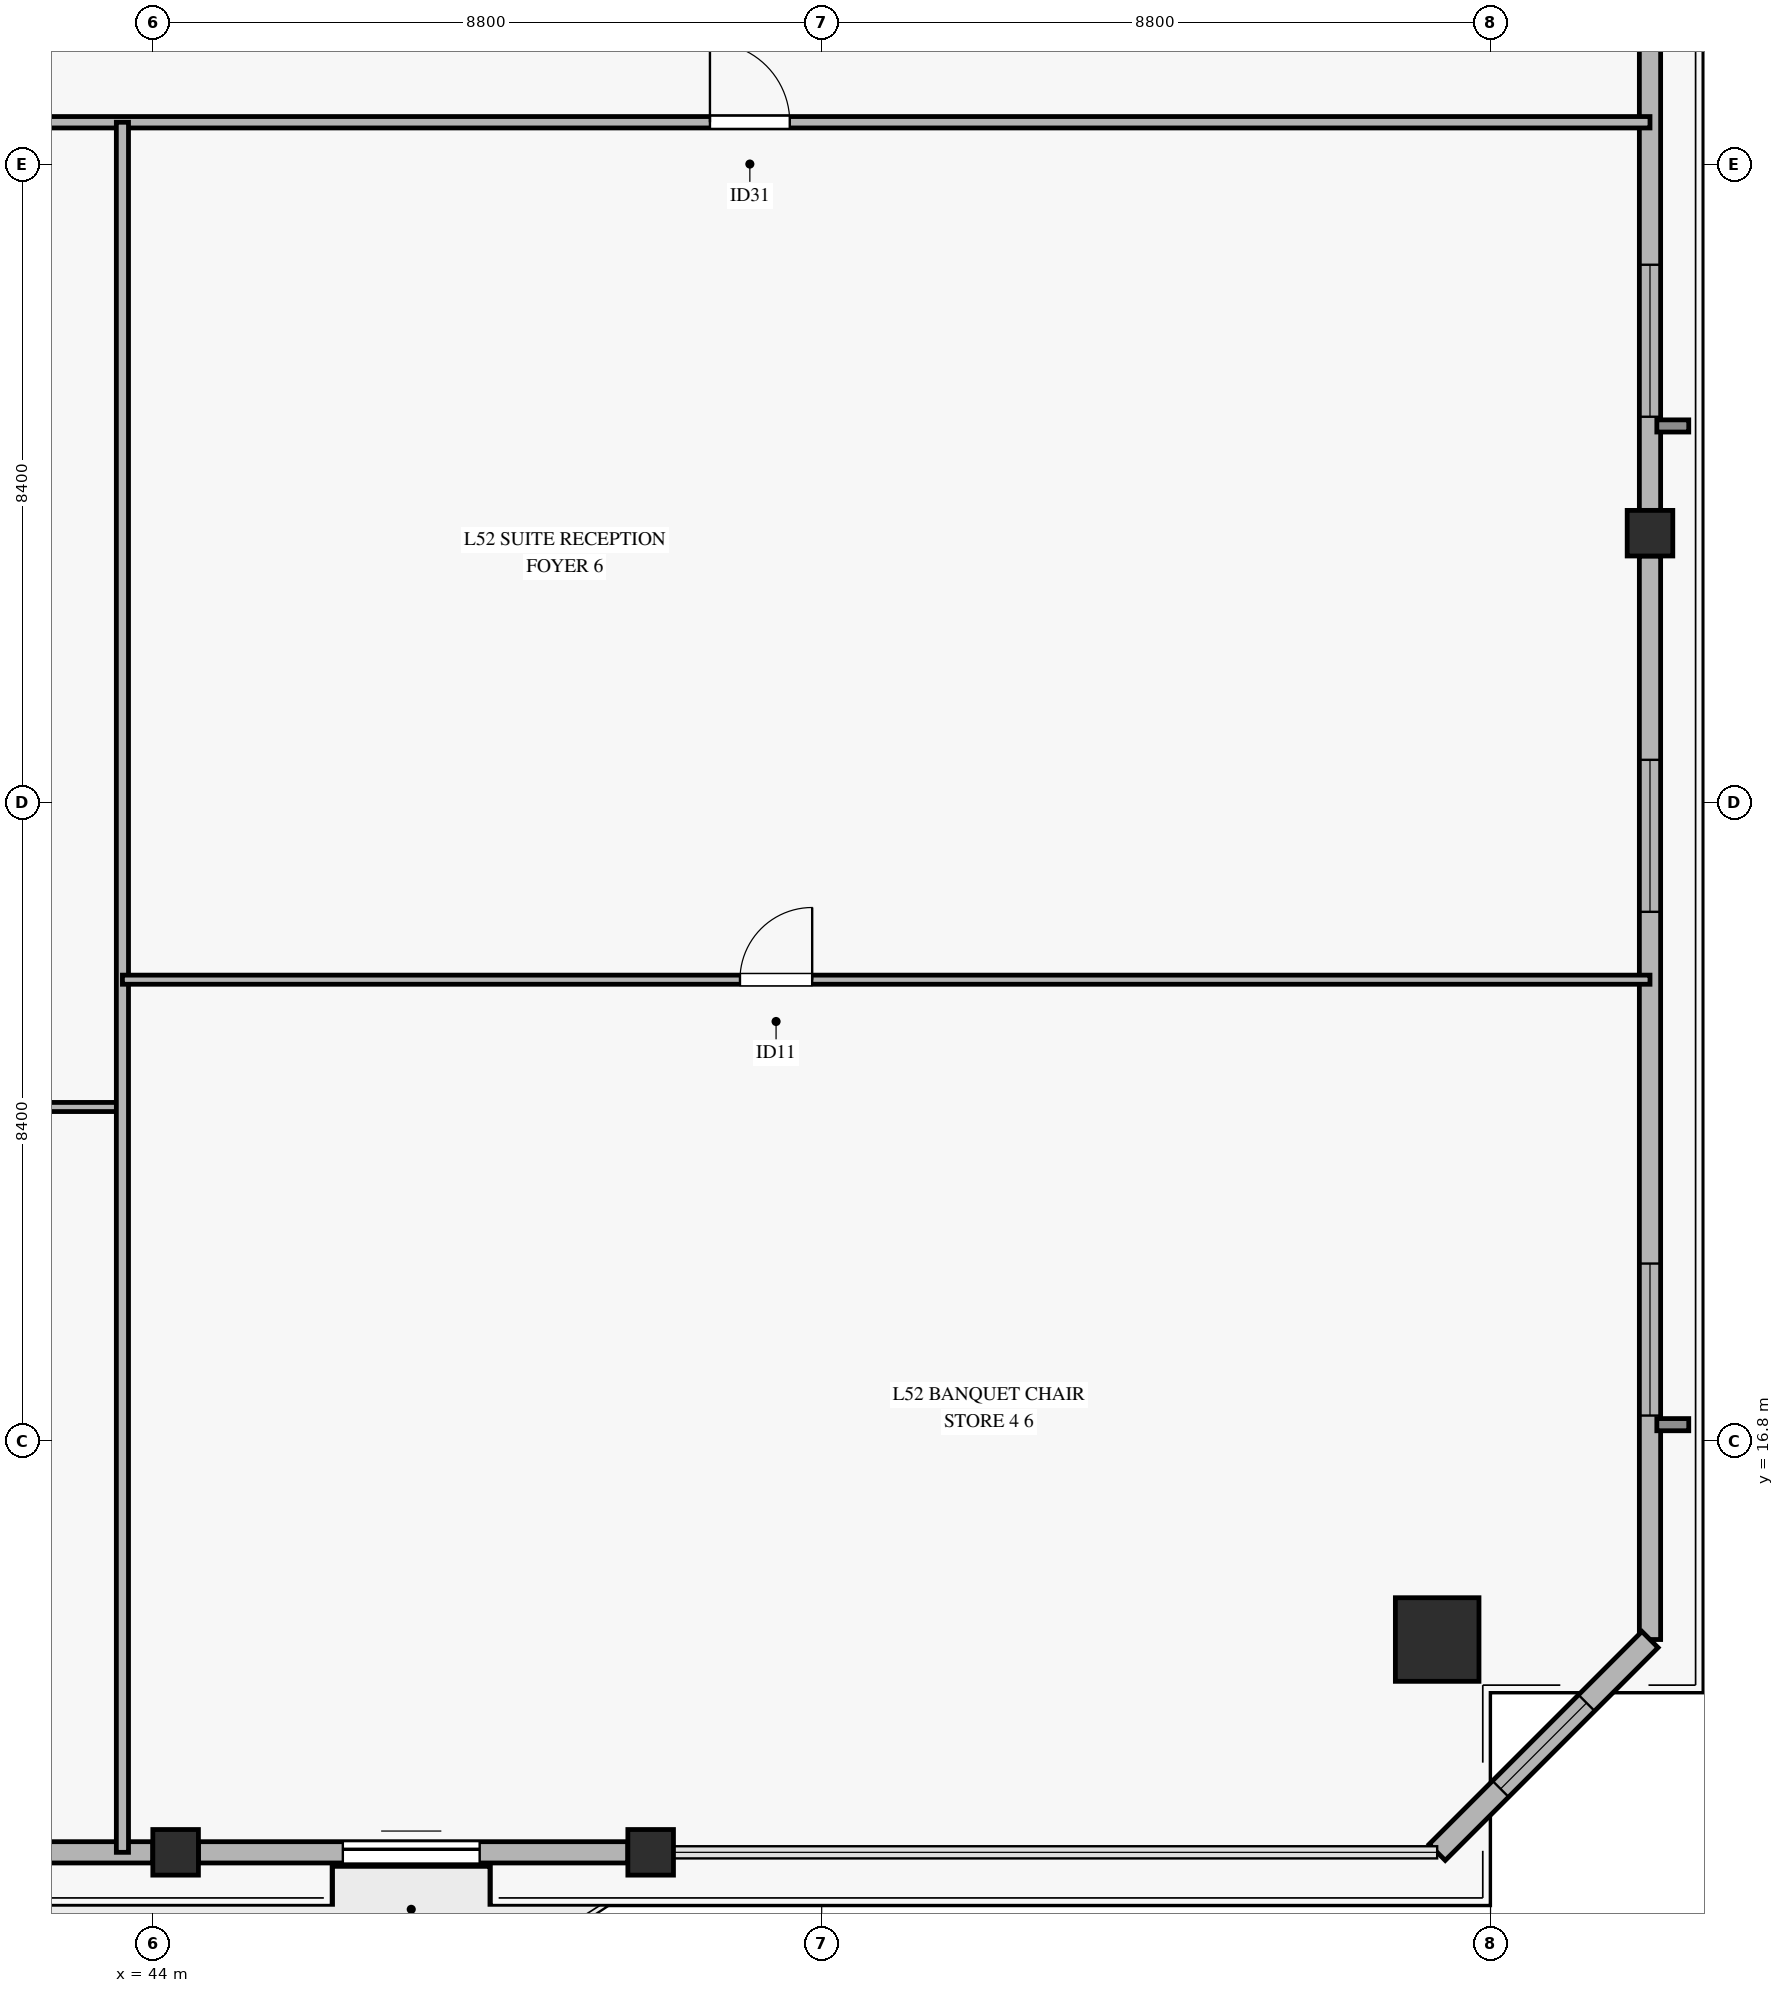
"""IFC4 building model, lengths in metres.
Left out: names, types, materials, properties, quantities, classifications, styles, units other than length and angle.
Written with IfcOpenShell. Run it as: python <this file> out.ifc"""

import sys

from ifc_helpers import new_model, si_unit, direction, frame, frame_2d, origin, origin_2d, place, context, subcontext, project, spatial, rectangle, hollow_rectangle, extrude, source, transform, mapped, element, fill, save


model = new_model("IFC4")
c1 = context("Model", 3, precision=1e-05, world=origin(), true_north=direction((0.0, 1.0)))
c2 = subcontext(c1, "Body", "Model", "MODEL_VIEW")
j1 = project(units=[si_unit("LENGTHUNIT", "METRE"), si_unit("PLANEANGLEUNIT", "RADIAN")], contexts=[c1])
p1 = place(None, origin())
s1 = spatial("IfcSite", under=j1, at=p1, CompositionType="ELEMENT")
p2 = place(p1, origin())
s2 = spatial("IfcBuilding", under=s1, at=p2, CompositionType="ELEMENT")
p3 = place(p2, frame((0.0, 0.0, 206.2)))
s3 = spatial("IfcBuildingStorey", under=s2, at=p3, CompositionType="ELEMENT", Elevation=206.2)
m1 = source(origin(), c2, "Body", "SweptSolid", [
    extrude(hollow_rectangle(XDim=1.1, YDim=1.1, WallThickness=0.05, at=origin_2d()), origin(), (0.0, 0.0, 1.0), 3.27),
])
p4 = place(p3, frame((60.898, 14.186, 0.0), z_axis=(0.0, 0.0, 1.0), x_axis=(1.0, 0.0, 0.0)))
e1 = element("IfcColumn", 1, at=p4, inside=s3, PredefinedType="COLUMN", context=c2, shape_type="MappedRepresentation", body=[
    mapped(m1, transform((0.0, 0.0, 0.0), x_axis=(1.0, 0.0, 0.0), y_axis=(0.0, 1.0, 0.0), z_axis=(0.0, 0.0, 1.0), scale=1.0)),
])
m2 = source(origin(), c2, "Body", "SweptSolid", [
    extrude(hollow_rectangle(XDim=0.6, YDim=0.6, WallThickness=0.028, at=origin_2d()), origin(), (0.0, 0.0, 1.0), 3.27),
])
for number, where, z_axis, x_axis in (
    (2, (44.3, 11.386, 0.0), (0.0, 0.0, 1.0), (1.0, 0.0, 0.0)),
    (3, (50.55, 11.386, 0.0), (0.0, 0.0, 1.0), (1.0, 0.0, 0.0)),
    (4, (63.698, 28.743, 0.0), (0.0, 0.0, 1.0), (1.0, 0.0, 0.0)),
):
    element("IfcColumn", number, at=place(p3, frame(where, z_axis=z_axis, x_axis=x_axis)), inside=s3, PredefinedType="COLUMN", context=c2, shape_type="MappedRepresentation", body=[
        mapped(m2, transform((0.0, 0.0, 0.0), x_axis=(1.0, 0.0, 0.0), y_axis=(0.0, 1.0, 0.0), z_axis=(0.0, 0.0, 1.0), scale=1.0)),
    ])
p5 = place(p3, frame((37.85, 11.386, 0.0), z_axis=(0.0, 0.0, 1.0), x_axis=(1.0, 0.0, 0.0)))
e5 = element("IfcWall", 5, at=p5, inside=s3, PredefinedType="SOLIDWALL", context=c2, shape_type="SweptSolid", body=[
    extrude(rectangle(XDim=6.15, YDim=0.28, at=frame_2d((3.075, 0.0))), origin(), (0.0, 0.0, 1.0), 2.75),
])
p6 = place(p3, frame((44.6, 11.386, 0.0), z_axis=(0.0, 0.0, 1.0), x_axis=(1.0, 0.0, 0.0)))
e6 = element("IfcWall", 6, at=p6, inside=s3, PredefinedType="SOLIDWALL", context=c2, shape_type="SweptSolid", body=[
    extrude(rectangle(XDim=5.65, YDim=0.28, at=frame_2d((2.825, 0.0))), origin(), (0.0, 0.0, 1.0), 2.75),
])
p7 = place(p6, frame((1.9, 0.0, 0.0)))
e7 = element("IfcOpeningElement", 7, at=p7, cuts=e6, PredefinedType="OPENING", context=c2, shape_type="SweptSolid", body=[
    extrude(rectangle(XDim=1.8, YDim=2.25, at=frame_2d((0.9, 1.125))), frame((0.0, 0.15, 0.0), z_axis=(0.0, -1.0, 0.0), x_axis=(1.0, 0.0, 0.0)), (0.0, 0.0, 1.0), 0.3),
])
p8 = place(p3, frame((63.698, 14.186, 0.0), z_axis=(0.0, 0.0, 1.0), x_axis=(0.0, 1.0, 0.0)))
e8 = element("IfcWall", 8, at=p8, inside=s3, PredefinedType="SOLIDWALL", context=c2, shape_type="SweptSolid", body=[
    extrude(rectangle(XDim=14.257, YDim=0.28, at=frame_2d((7.128, 0.0))), origin(), (0.0, 0.0, 1.0), 2.75),
])
p9 = place(p8, frame((2.947, 0.0, 0.45)))
e9 = element("IfcOpeningElement", 9, at=p9, cuts=e8, PredefinedType="OPENING", context=c2, shape_type="SweptSolid", body=[
    extrude(rectangle(XDim=2.0, YDim=2.0, at=frame_2d((1.0, 1.0))), frame((0.0, 0.15, 0.0), z_axis=(0.0, -1.0, 0.0), x_axis=(1.0, 0.0, 0.0)), (0.0, 0.0, 1.0), 0.3),
])
p10 = place(p8, frame((9.575, 0.0, 0.45)))
e10 = element("IfcOpeningElement", 10, at=p10, cuts=e8, PredefinedType="OPENING", context=c2, shape_type="SweptSolid", body=[
    extrude(rectangle(XDim=2.0, YDim=2.0, at=frame_2d((1.0, 1.0))), frame((0.0, 0.15, 0.0), z_axis=(0.0, -1.0, 0.0), x_axis=(1.0, 0.0, 0.0)), (0.0, 0.0, 1.0), 0.3),
])
p11 = place(p3, frame((63.698, 29.043, 0.0), z_axis=(0.0, 0.0, 1.0), x_axis=(0.0, 1.0, 0.0)))
e11 = element("IfcWall", 11, at=p11, inside=s3, PredefinedType="SOLIDWALL", context=c2, shape_type="SweptSolid", body=[
    extrude(rectangle(XDim=14.257, YDim=0.28, at=frame_2d((7.128, 0.0))), origin(), (0.0, 0.0, 1.0), 2.75),
])
p12 = place(p11, frame((1.232, 0.0, 0.45)))
e12 = element("IfcOpeningElement", 12, at=p12, cuts=e11, PredefinedType="OPENING", context=c2, shape_type="SweptSolid", body=[
    extrude(rectangle(XDim=2.0, YDim=2.0, at=frame_2d((1.0, 1.0))), frame((0.0, 0.15, 0.0), z_axis=(0.0, -1.0, 0.0), x_axis=(1.0, 0.0, 0.0)), (0.0, 0.0, 1.0), 0.3),
])
p13 = place(p11, frame((11.108, 0.0, 0.45)))
e13 = element("IfcOpeningElement", 13, at=p13, cuts=e11, PredefinedType="OPENING", context=c2, shape_type="SweptSolid", body=[
    extrude(rectangle(XDim=2.0, YDim=2.0, at=frame_2d((1.0, 1.0))), frame((0.0, 0.15, 0.0), z_axis=(0.0, -1.0, 0.0), x_axis=(1.0, 0.0, 0.0)), (0.0, 0.0, 1.0), 0.3),
])
p14 = place(p3, frame((60.898, 11.386, 0.0), z_axis=(0.0, 0.0, 1.0), x_axis=(0.707106781187, 0.707106781187, 0.0)))
e14 = element("IfcWall", 14, at=p14, inside=s3, PredefinedType="SOLIDWALL", context=c2, shape_type="SweptSolid", body=[
    extrude(rectangle(XDim=3.96, YDim=0.3, at=frame_2d((1.98, 0.0))), origin(), (0.0, 0.0, 1.0), 2.75),
])
p15 = place(p14, frame((1.18, 0.0, 0.45)))
e15 = element("IfcOpeningElement", 15, at=p15, cuts=e14, PredefinedType="OPENING", context=c2, shape_type="SweptSolid", body=[
    extrude(rectangle(XDim=1.6, YDim=2.0, at=frame_2d((0.8, 1.0))), frame((0.0, 0.16, 0.0), z_axis=(0.0, -1.0, 0.0), x_axis=(1.0, 0.0, 0.0)), (0.0, 0.0, 1.0), 0.32),
])
p16 = place(p3, frame((6.703, 34.15, 0.0), z_axis=(0.0, 0.0, 1.0), x_axis=(1.0, 0.0, 0.0)))
e16 = element("IfcWall", 16, at=p16, inside=s3, PredefinedType="PARTITIONING", context=c2, shape_type="SweptSolid", body=[
    extrude(rectangle(XDim=56.995, YDim=0.15, at=frame_2d((28.498, 0.0))), origin(), (0.0, 0.0, 1.0), 2.455),
])
p17 = place(p16, frame((6.03, 0.0, 0.0)))
e17 = element("IfcOpeningElement", 17, at=p17, cuts=e16, PredefinedType="OPENING", context=c2, shape_type="SweptSolid", body=[
    extrude(rectangle(XDim=1.05, YDim=2.15, at=frame_2d((0.525, 1.075))), frame((0.0, 0.085, 0.0), z_axis=(0.0, -1.0, 0.0), x_axis=(1.0, 0.0, 0.0)), (0.0, 0.0, 1.0), 0.17),
])
p18 = place(p16, frame((17.622, 0.0, 0.0)))
e18 = element("IfcOpeningElement", 18, at=p18, cuts=e16, PredefinedType="OPENING", context=c2, shape_type="SweptSolid", body=[
    extrude(rectangle(XDim=1.05, YDim=2.15, at=frame_2d((0.525, 1.075))), frame((0.0, 0.085, 0.0), z_axis=(0.0, -1.0, 0.0), x_axis=(1.0, 0.0, 0.0)), (0.0, 0.0, 1.0), 0.17),
])
p19 = place(p16, frame((23.442, 0.0, 0.0)))
e19 = element("IfcOpeningElement", 19, at=p19, cuts=e16, PredefinedType="OPENING", context=c2, shape_type="SweptSolid", body=[
    extrude(rectangle(XDim=1.05, YDim=2.15, at=frame_2d((0.525, 1.075))), frame((0.0, 0.085, 0.0), z_axis=(0.0, -1.0, 0.0), x_axis=(1.0, 0.0, 0.0)), (0.0, 0.0, 1.0), 0.17),
])
p20 = place(p16, frame((28.933, 0.0, 0.0)))
e20 = element("IfcOpeningElement", 20, at=p20, cuts=e16, PredefinedType="OPENING", context=c2, shape_type="SweptSolid", body=[
    extrude(rectangle(XDim=1.05, YDim=2.15, at=frame_2d((0.525, 1.075))), frame((0.0, 0.085, 0.0), z_axis=(0.0, -1.0, 0.0), x_axis=(1.0, 0.0, 0.0)), (0.0, 0.0, 1.0), 0.17),
])
p21 = place(p16, frame((34.133, 0.0, 0.0)))
e21 = element("IfcOpeningElement", 21, at=p21, cuts=e16, PredefinedType="OPENING", context=c2, shape_type="SweptSolid", body=[
    extrude(rectangle(XDim=1.05, YDim=2.15, at=frame_2d((0.525, 1.075))), frame((0.0, 0.085, 0.0), z_axis=(0.0, -1.0, 0.0), x_axis=(1.0, 0.0, 0.0)), (0.0, 0.0, 1.0), 0.17),
])
p22 = place(p16, frame((44.627, 0.0, 0.0)))
e22 = element("IfcOpeningElement", 22, at=p22, cuts=e16, PredefinedType="OPENING", context=c2, shape_type="SweptSolid", body=[
    extrude(rectangle(XDim=1.05, YDim=2.15, at=frame_2d((0.525, 1.075))), frame((0.0, 0.085, 0.0), z_axis=(0.0, -1.0, 0.0), x_axis=(1.0, 0.0, 0.0)), (0.0, 0.0, 1.0), 0.17),
])
p23 = place(p3, frame((38.4, 21.193, 0.0), z_axis=(0.0, 0.0, 1.0), x_axis=(1.0, 0.0, 0.0)))
e23 = element("IfcWall", 23, at=p23, inside=s3, PredefinedType="PARTITIONING", context=c2, shape_type="SweptSolid", body=[
    extrude(rectangle(XDim=5.2, YDim=0.12, at=frame_2d((2.6, 0.0))), origin(), (0.0, 0.0, 1.0), 3.27),
])
p24 = place(p23, frame((2.325, 0.0, 0.0)))
e24 = element("IfcOpeningElement", 24, at=p24, cuts=e23, PredefinedType="OPENING", context=c2, shape_type="SweptSolid", body=[
    extrude(rectangle(XDim=0.95, YDim=2.1, at=frame_2d((0.475, 1.05))), frame((0.0, 0.07, 0.0), z_axis=(0.0, -1.0, 0.0), x_axis=(1.0, 0.0, 0.0)), (0.0, 0.0, 1.0), 0.14),
])
p25 = place(p3, frame((43.6, 11.386, 0.0), z_axis=(0.0, 0.0, 1.0), x_axis=(0.0, 1.0, 0.0)))
e25 = element("IfcWall", 25, at=p25, inside=s3, PredefinedType="PARTITIONING", context=c2, shape_type="SweptSolid", body=[
    extrude(rectangle(XDim=22.764, YDim=0.16, at=frame_2d((11.382, 0.0))), origin(), (0.0, 0.0, 1.0), 2.755),
])
p26 = place(p3, frame((43.6, 22.868, 0.0), z_axis=(0.0, 0.0, 1.0), x_axis=(1.0, 0.0, 0.0)))
e26 = element("IfcWall", 26, at=p26, inside=s3, PredefinedType="PARTITIONING", context=c2, shape_type="SweptSolid", body=[
    extrude(rectangle(XDim=20.098, YDim=0.12, at=frame_2d((10.049, 0.0))), origin(), (0.0, 0.0, 1.0), 2.455),
])
p27 = place(p26, frame((8.125, 0.0, 0.0)))
e27 = element("IfcOpeningElement", 27, at=p27, cuts=e26, PredefinedType="OPENING", context=c2, shape_type="SweptSolid", body=[
    extrude(rectangle(XDim=0.95, YDim=2.1, at=frame_2d((0.475, 1.05))), frame((0.0, 0.07, 0.0), z_axis=(0.0, -1.0, 0.0), x_axis=(1.0, 0.0, 0.0)), (0.0, 0.0, 1.0), 0.14),
])
m3 = source(origin(), c2, "Body", "SweptSolid", [
    extrude(rectangle(XDim=1.8, YDim=2.25, at=frame_2d((0.9, 1.125))), frame((0.0, 0.025, 0.0), z_axis=(0.0, -1.0, 0.0), x_axis=(1.0, 0.0, 0.0)), (0.0, 0.0, 1.0), 0.05),
])
p28 = place(p7, origin())
e28 = element("IfcDoor", 28, at=p28, inside=s3, OperationType="SLIDING_TO_LEFT", PredefinedType="DOOR", context=c2, shape_type="MappedRepresentation", body=[
    mapped(m3, transform((0.0, 0.0, 0.0), x_axis=(1.0, 0.0, 0.0), y_axis=(0.0, 1.0, 0.0), z_axis=(0.0, 0.0, 1.0), scale=1.0)),
])
fill(e7, e28)
m4 = source(origin(), c2, "Body", "SweptSolid", [
    extrude(rectangle(XDim=2.0, YDim=2.0, at=frame_2d((1.0, 1.0))), frame((0.0, 0.03, 0.0), z_axis=(0.0, -1.0, 0.0), x_axis=(1.0, 0.0, 0.0)), (0.0, 0.0, 1.0), 0.06),
])
p29 = place(p9, origin())
e29 = element("IfcWindow", 29, at=p29, inside=s3, PartitioningType="SINGLE_PANEL", PredefinedType="WINDOW", context=c2, shape_type="MappedRepresentation", body=[
    mapped(m4, transform((0.0, 0.0, 0.0), x_axis=(1.0, 0.0, 0.0), y_axis=(0.0, 1.0, 0.0), z_axis=(0.0, 0.0, 1.0), scale=1.0)),
])
fill(e9, e29)
p30 = place(p10, origin())
e30 = element("IfcWindow", 30, at=p30, inside=s3, PartitioningType="SINGLE_PANEL", PredefinedType="WINDOW", context=c2, shape_type="MappedRepresentation", body=[
    mapped(m4, transform((0.0, 0.0, 0.0), x_axis=(1.0, 0.0, 0.0), y_axis=(0.0, 1.0, 0.0), z_axis=(0.0, 0.0, 1.0), scale=1.0)),
])
fill(e10, e30)
p31 = place(p12, origin())
e31 = element("IfcWindow", 31, at=p31, inside=s3, PartitioningType="SINGLE_PANEL", PredefinedType="WINDOW", context=c2, shape_type="MappedRepresentation", body=[
    mapped(m4, transform((0.0, 0.0, 0.0), x_axis=(1.0, 0.0, 0.0), y_axis=(0.0, 1.0, 0.0), z_axis=(0.0, 0.0, 1.0), scale=1.0)),
])
fill(e12, e31)
m5 = source(origin(), c2, "Body", "SweptSolid", [
    extrude(rectangle(XDim=1.6, YDim=2.0, at=frame_2d((0.8, 1.0))), frame((0.0, 0.03, 0.0), z_axis=(0.0, -1.0, 0.0), x_axis=(1.0, 0.0, 0.0)), (0.0, 0.0, 1.0), 0.06),
])
p32 = place(p15, origin())
e32 = element("IfcWindow", 32, at=p32, inside=s3, PartitioningType="SINGLE_PANEL", PredefinedType="WINDOW", context=c2, shape_type="MappedRepresentation", body=[
    mapped(m5, transform((0.0, 0.0, 0.0), x_axis=(1.0, 0.0, 0.0), y_axis=(0.0, 1.0, 0.0), z_axis=(0.0, 0.0, 1.0), scale=1.0)),
])
fill(e15, e32)
m6 = source(origin(), c2, "Body", "SweptSolid", [
    extrude(rectangle(XDim=1.05, YDim=2.15, at=frame_2d((0.525, 1.075))), frame((0.0, 0.025, 0.0), z_axis=(0.0, -1.0, 0.0), x_axis=(1.0, 0.0, 0.0)), (0.0, 0.0, 1.0), 0.05),
])
p33 = place(p22, origin())
e33 = element("IfcDoor", 33, at=p33, inside=s3, OperationType="SINGLE_SWING_LEFT", PredefinedType="DOOR", context=c2, shape_type="MappedRepresentation", body=[
    mapped(m6, transform((0.0, 0.0, 0.0), x_axis=(1.0, 0.0, 0.0), y_axis=(0.0, 1.0, 0.0), z_axis=(0.0, 0.0, 1.0), scale=1.0)),
])
fill(e22, e33)
m7 = source(origin(), c2, "Body", "SweptSolid", [
    extrude(rectangle(XDim=0.95, YDim=2.1, at=frame_2d((0.475, 1.05))), frame((0.0, 0.025, 0.0), z_axis=(0.0, -1.0, 0.0), x_axis=(1.0, 0.0, 0.0)), (0.0, 0.0, 1.0), 0.05),
])
p34 = place(p27, origin())
e34 = element("IfcDoor", 34, at=p34, inside=s3, OperationType="SINGLE_SWING_RIGHT", PredefinedType="DOOR", context=c2, shape_type="MappedRepresentation", body=[
    mapped(m7, transform((0.0, 0.0, 0.0), x_axis=(1.0, 0.0, 0.0), y_axis=(0.0, 1.0, 0.0), z_axis=(0.0, 0.0, 1.0), scale=1.0)),
])
fill(e27, e34)
save(model, sys.argv[1])
